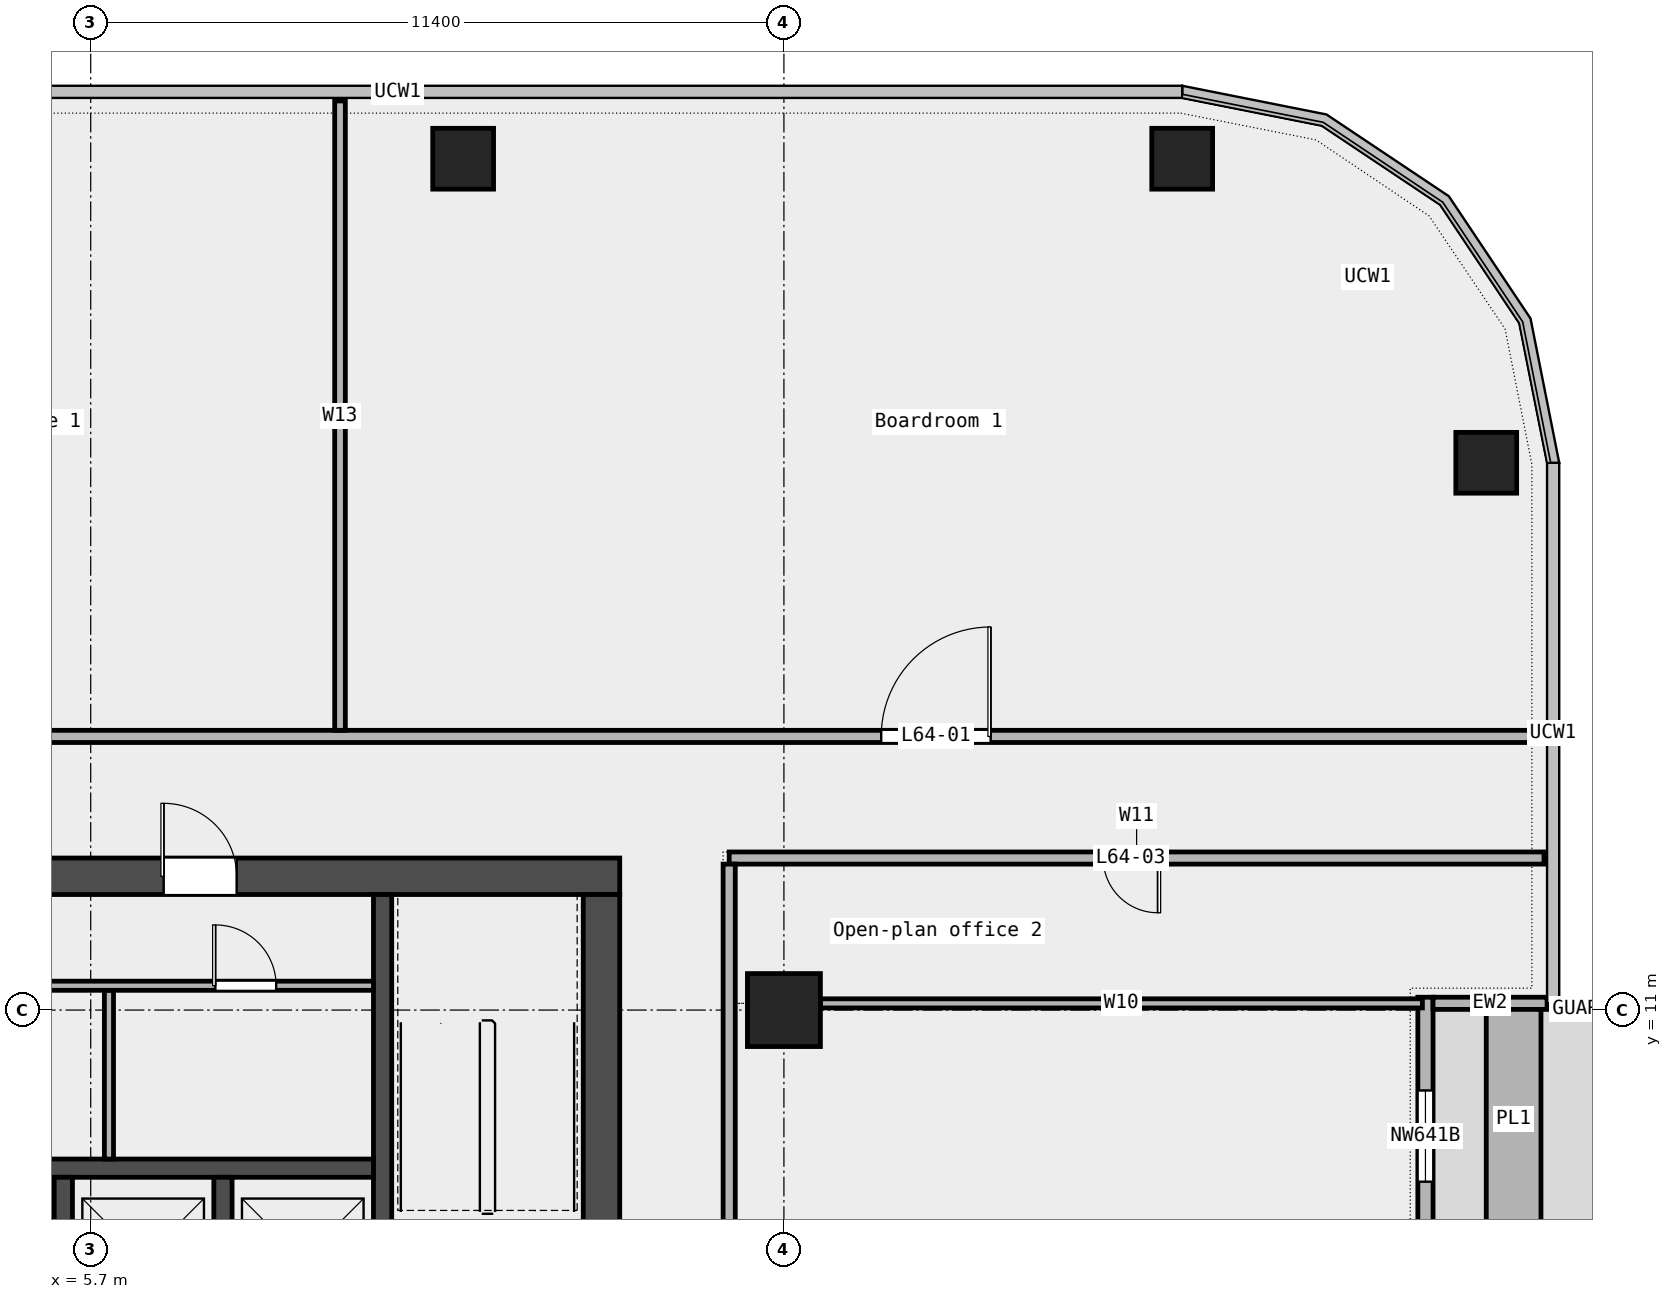
"""IFC4 building model, lengths in metres.
Left out: names, types, materials, properties, quantities, classifications, styles, units other than length and angle.
Written with IfcOpenShell. Run it as: python <this file> out.ifc"""

import sys

from ifc_helpers import new_model, si_unit, direction, frame, frame_2d, origin, origin_2d, place, context, subcontext, project, spatial, rectangle, extrude, element, fill, save


model = new_model("IFC4")
c1 = context("Model", 3, precision=1e-05, world=origin(), true_north=direction((0.0, 1.0)))
c2 = subcontext(c1, "Body", "Model", "MODEL_VIEW")
j1 = project(units=[si_unit("LENGTHUNIT", "METRE"), si_unit("PLANEANGLEUNIT", "RADIAN")], contexts=[c1])
p1 = place(None, origin())
s1 = spatial("IfcSite", under=j1, at=p1, CompositionType="ELEMENT")
p2 = place(p1, origin())
s2 = spatial("IfcBuilding", under=s1, at=p2, CompositionType="ELEMENT")
p3 = place(p2, frame((0.0, 0.0, 295.4)))
s3 = spatial("IfcBuildingStorey", under=s2, at=p3, CompositionType="ELEMENT", Elevation=295.4)
for number, where, z_axis, x_axis in (
    (1, (28.65, 20.0, 0.0), (0.0, 0.0, 1.0), (1.0, 0.0, 0.0)),
    (2, (23.65, 25.0, 0.0), (0.0, 0.0, 1.0), (1.0, 0.0, 0.0)),
    (3, (11.825, 25.0, 0.0), (0.0, 0.0, 1.0), (1.0, 0.0, 0.0)),
):
    element("IfcColumn", number, at=place(p3, frame(where, z_axis=z_axis, x_axis=x_axis)), inside=s3, PredefinedType="COLUMN", context=c2, shape_type="SweptSolid", body=[
        extrude(rectangle(XDim=1.0, YDim=1.0, at=origin_2d()), origin(), (0.0, 0.0, 1.0), 3.6),
    ])
p4 = place(p3, frame((17.1, 11.0, 0.0), z_axis=(0.0, 0.0, 1.0), x_axis=(1.0, 0.0, 0.0)))
e4 = element("IfcColumn", 4, at=p4, inside=s3, PredefinedType="COLUMN", context=c2, shape_type="SweptSolid", body=[
    extrude(rectangle(XDim=1.2, YDim=1.2, at=origin_2d()), origin(), (0.0, 0.0, 1.0), 3.6),
])
p5 = place(p3, frame((27.65, -2.322, 0.0), z_axis=(0.0, 0.0, 1.0), x_axis=(0.0, 1.0, 0.0)))
e5 = element("IfcWall", 5, at=p5, inside=s3, PredefinedType="STANDARD", context=c2, shape_type="SweptSolid", body=[
    extrude(rectangle(XDim=13.533, YDim=0.25, at=frame_2d((6.767, 0.0))), origin(), (0.0, 0.0, 1.0), 3.6),
])
p6 = place(p5, frame((1.5, 0.0, 0.45)))
e6 = element("IfcOpeningElement", 6, at=p6, cuts=e5, PredefinedType="OPENING", context=c2, shape_type="SweptSolid", body=[
    extrude(rectangle(XDim=1.5, YDim=2.4, at=frame_2d((0.75, 1.2))), frame((0.0, 0.137, 0.0), z_axis=(0.0, -1.0, 0.0), x_axis=(1.0, 0.0, 0.0)), (0.0, 0.0, 1.0), 0.274),
])
p7 = place(p5, frame((5.75, 0.0, 0.0)))
e7 = element("IfcOpeningElement", 7, at=p7, cuts=e5, PredefinedType="OPENING", context=c2, shape_type="SweptSolid", body=[
    extrude(rectangle(XDim=1.8, YDim=2.4, at=frame_2d((0.9, 1.2))), frame((0.0, 0.137, 0.0), z_axis=(0.0, -1.0, 0.0), x_axis=(1.0, 0.0, 0.0)), (0.0, 0.0, 1.0), 0.274),
])
p8 = place(p5, frame((10.5, 0.0, 0.45)))
e8 = element("IfcOpeningElement", 8, at=p8, cuts=e5, PredefinedType="OPENING", context=c2, shape_type="SweptSolid", body=[
    extrude(rectangle(XDim=1.5, YDim=2.4, at=frame_2d((0.75, 1.2))), frame((0.0, 0.137, 0.0), z_axis=(0.0, -1.0, 0.0), x_axis=(1.0, 0.0, 0.0)), (0.0, 0.0, 1.0), 0.274),
])
p9 = place(p3, frame((29.65, 11.111, 0.0), z_axis=(0.0, 0.0, 1.0), x_axis=(-1.0, 0.0, 0.0)))
e9 = element("IfcWall", 9, at=p9, inside=s3, PredefinedType="STANDARD", context=c2, shape_type="SweptSolid", body=[
    extrude(rectangle(XDim=1.875, YDim=0.2, at=frame_2d((0.938, 0.0))), origin(), (0.0, 0.0, 1.0), 3.6),
])
p10 = place(p3, frame((29.1, 7.411, 0.0), z_axis=(0.0, 0.0, 1.0), x_axis=(0.0, 1.0, 0.0)))
e10 = element("IfcWall", 10, at=p10, inside=s3, PredefinedType="STANDARD", context=c2, shape_type="SweptSolid", body=[
    extrude(rectangle(XDim=3.6, YDim=0.9, at=frame_2d((1.8, 0.0))), origin(), (0.0, 0.0, 1.0), 0.7),
])
p11 = place(p3, frame((17.7, 11.11, 0.0), z_axis=(0.0, 0.0, 1.0), x_axis=(1.0, 0.0, 0.0)))
e11 = element("IfcWall", 11, at=p11, inside=s3, PredefinedType="PARTITIONING", context=c2, shape_type="SweptSolid", body=[
    extrude(rectangle(XDim=9.9, YDim=0.15, at=frame_2d((4.95, 0.0))), origin(), (0.0, 0.0, 1.0), 3.6),
])
p12 = place(p3, frame((16.2, 13.5, 0.0), z_axis=(0.0, 0.0, 1.0), x_axis=(1.0, 0.0, 0.0)))
e12 = element("IfcWall", 12, at=p12, inside=s3, PredefinedType="PARTITIONING", context=c2, shape_type="SweptSolid", body=[
    extrude(rectangle(XDim=13.4, YDim=0.2, at=frame_2d((6.7, 0.0))), origin(), (0.0, 0.0, 1.0), 3.6),
])
p13 = place(p12, frame((6.15, 0.0, 0.0)))
e13 = element("IfcOpeningElement", 13, at=p13, cuts=e12, PredefinedType="OPENING", context=c2, shape_type="SweptSolid", body=[
    extrude(rectangle(XDim=0.9, YDim=2.1, at=frame_2d((0.45, 1.05))), frame((0.0, 0.112, 0.0), z_axis=(0.0, -1.0, 0.0), x_axis=(1.0, 0.0, 0.0)), (0.0, 0.0, 1.0), 0.224),
])
p14 = place(p3, frame((-29.6, 15.5, 0.0), z_axis=(0.0, 0.0, 1.0), x_axis=(1.0, 0.0, 0.0)))
e14 = element("IfcWall", 14, at=p14, inside=s3, PredefinedType="PARTITIONING", context=c2, shape_type="SweptSolid", body=[
    extrude(rectangle(XDim=59.2, YDim=0.2, at=frame_2d((29.6, 0.0))), origin(), (0.0, 0.0, 1.0), 3.6),
])
p15 = place(p14, frame((48.3, 0.0, 0.0)))
e15 = element("IfcOpeningElement", 15, at=p15, cuts=e14, PredefinedType="OPENING", context=c2, shape_type="SweptSolid", body=[
    extrude(rectangle(XDim=1.8, YDim=2.1, at=frame_2d((0.9, 1.05))), frame((0.0, 0.112, 0.0), z_axis=(0.0, -1.0, 0.0), x_axis=(1.0, 0.0, 0.0)), (0.0, 0.0, 1.0), 0.224),
])
p16 = place(p14, frame((32.675, 0.0, 0.0)))
e16 = element("IfcOpeningElement", 16, at=p16, cuts=e14, PredefinedType="OPENING", context=c2, shape_type="SweptSolid", body=[
    extrude(rectangle(XDim=1.5, YDim=2.1, at=frame_2d((0.75, 1.05))), frame((0.0, 0.112, 0.0), z_axis=(0.0, -1.0, 0.0), x_axis=(1.0, 0.0, 0.0)), (0.0, 0.0, 1.0), 0.224),
])
p17 = place(p14, frame((6.625, 0.0, 0.0)))
e17 = element("IfcOpeningElement", 17, at=p17, cuts=e14, PredefinedType="OPENING", context=c2, shape_type="SweptSolid", body=[
    extrude(rectangle(XDim=1.5, YDim=2.1, at=frame_2d((0.75, 1.05))), frame((0.0, 0.112, 0.0), z_axis=(0.0, -1.0, 0.0), x_axis=(1.0, 0.0, 0.0)), (0.0, 0.0, 1.0), 0.224),
])
p18 = place(p14, frame((20.25, 0.0, 0.0)))
e18 = element("IfcOpeningElement", 18, at=p18, cuts=e14, PredefinedType="OPENING", context=c2, shape_type="SweptSolid", body=[
    extrude(rectangle(XDim=1.5, YDim=2.1, at=frame_2d((0.75, 1.05))), frame((0.0, 0.112, 0.0), z_axis=(0.0, -1.0, 0.0), x_axis=(1.0, 0.0, 0.0)), (0.0, 0.0, 1.0), 0.224),
])
p19 = place(p3, frame((9.8, 15.6, 0.0), z_axis=(0.0, 0.0, 1.0), x_axis=(0.0, 1.0, 0.0)))
e19 = element("IfcWall", 19, at=p19, inside=s3, PredefinedType="PARTITIONING", context=c2, shape_type="SweptSolid", body=[
    extrude(rectangle(XDim=10.35, YDim=0.175, at=frame_2d((5.175, 0.0))), origin(), (0.0, 0.0, 1.0), 3.6),
])
p20 = place(p3, frame((16.2, -7.1, 0.0), z_axis=(0.0, 0.0, 1.0), x_axis=(0.0, 1.0, 0.0)))
e20 = element("IfcWall", 20, at=p20, inside=s3, PredefinedType="PARTITIONING", context=c2, shape_type="SweptSolid", body=[
    extrude(rectangle(XDim=20.5, YDim=0.2, at=frame_2d((10.25, 0.0))), origin(), (0.0, 0.0, 1.0), 3.6),
])
p21 = place(p20, frame((10.795, 0.0, 0.0)))
e21 = element("IfcOpeningElement", 21, at=p21, cuts=e20, PredefinedType="OPENING", context=c2, shape_type="SweptSolid", body=[
    extrude(rectangle(XDim=1.5, YDim=2.1, at=frame_2d((0.75, 1.05))), frame((0.0, 0.112, 0.0), z_axis=(0.0, -1.0, 0.0), x_axis=(1.0, 0.0, 0.0)), (0.0, 0.0, 1.0), 0.224),
])
p22 = place(p3, frame((-14.4, 13.2, 0.0), z_axis=(0.0, 0.0, 1.0), x_axis=(1.0, 0.0, 0.0)))
e22 = element("IfcWall", 22, at=p22, inside=s3, PredefinedType="SHEAR", context=c2, shape_type="SweptSolid", body=[
    extrude(rectangle(XDim=28.8, YDim=0.6, at=frame_2d((14.4, 0.0))), origin(), (0.0, 0.0, 1.0), 3.7),
])
p23 = place(p22, frame((6.3, 0.0, 0.0)))
e23 = element("IfcOpeningElement", 23, at=p23, cuts=e22, PredefinedType="OPENING", context=c2, shape_type="SweptSolid", body=[
    extrude(rectangle(XDim=1.2, YDim=2.1, at=frame_2d((0.6, 1.05))), frame((0.0, 0.312, 0.0), z_axis=(0.0, -1.0, 0.0), x_axis=(1.0, 0.0, 0.0)), (0.0, 0.0, 1.0), 0.624),
])
p24 = place(p22, frame((21.3, 0.0, 0.0)))
e24 = element("IfcOpeningElement", 24, at=p24, cuts=e22, PredefinedType="OPENING", context=c2, shape_type="SweptSolid", body=[
    extrude(rectangle(XDim=1.2, YDim=2.1, at=frame_2d((0.6, 1.05))), frame((0.0, 0.312, 0.0), z_axis=(0.0, -1.0, 0.0), x_axis=(1.0, 0.0, 0.0)), (0.0, 0.0, 1.0), 0.624),
])
p25 = place(p3, frame((14.1, -6.6, 0.0), z_axis=(0.0, 0.0, 1.0), x_axis=(0.0, 1.0, 0.0)))
e25 = element("IfcWall", 25, at=p25, inside=s3, PredefinedType="SHEAR", context=c2, shape_type="SweptSolid", body=[
    extrude(rectangle(XDim=19.5, YDim=0.6, at=frame_2d((9.75, 0.0))), origin(), (0.0, 0.0, 1.0), 3.7),
])
p26 = place(p25, frame((9.3, 0.0, 0.0)))
e26 = element("IfcOpeningElement", 26, at=p26, cuts=e25, PredefinedType="OPENING", context=c2, shape_type="SweptSolid", body=[
    extrude(rectangle(XDim=1.8, YDim=2.1, at=frame_2d((0.9, 1.05))), frame((0.0, 0.312, 0.0), z_axis=(0.0, -1.0, 0.0), x_axis=(1.0, 0.0, 0.0)), (0.0, 0.0, 1.0), 0.624),
])
p27 = place(p3, frame((10.5, 5.25, 0.0), z_axis=(0.0, 0.0, 1.0), x_axis=(0.0, 1.0, 0.0)))
e27 = element("IfcWall", 27, at=p27, inside=s3, PredefinedType="SHEAR", context=c2, shape_type="SweptSolid", body=[
    extrude(rectangle(XDim=7.65, YDim=0.3, at=frame_2d((3.825, 0.0))), origin(), (0.0, 0.0, 1.0), 3.7),
])
p28 = place(p3, frame((-10.35, 8.4, 0.0), z_axis=(0.0, 0.0, 1.0), x_axis=(1.0, 0.0, 0.0)))
e28 = element("IfcWall", 28, at=p28, inside=s3, PredefinedType="SOLIDWALL", context=c2, shape_type="SweptSolid", body=[
    extrude(rectangle(XDim=20.7, YDim=0.3, at=frame_2d((10.35, 0.0))), origin(), (0.0, 0.0, 1.0), 3.7),
])
for number, where, z_axis, x_axis in (
    (29, (5.25, 5.55, 0.0), (0.0, 0.0, 1.0), (0.0, 1.0, 0.0)),
    (30, (7.875, 5.55, 0.0), (0.0, 0.0, 1.0), (0.0, 1.0, 0.0)),
):
    element("IfcWall", number, at=place(p3, frame(where, z_axis=z_axis, x_axis=x_axis)), inside=s3, PredefinedType="SOLIDWALL", context=c2, shape_type="SweptSolid", body=[
        extrude(rectangle(XDim=2.7, YDim=0.3, at=frame_2d((1.35, 0.0))), origin(), (0.0, 0.0, 1.0), 3.7),
    ])
p29 = place(p3, frame((6.0, 8.55, 0.0), z_axis=(0.0, 0.0, 1.0), x_axis=(0.0, 1.0, 0.0)))
e31 = element("IfcWall", 31, at=p29, inside=s3, PredefinedType="PARTITIONING", context=c2, shape_type="SweptSolid", body=[
    extrude(rectangle(XDim=2.775, YDim=0.15, at=frame_2d((1.387, 0.0))), origin(), (0.0, 0.0, 1.0), 3.7),
])
p30 = place(p3, frame((-10.35, 11.4, 0.0), z_axis=(0.0, 0.0, 1.0), x_axis=(1.0, 0.0, 0.0)))
e32 = element("IfcWall", 32, at=p30, inside=s3, PredefinedType="PARTITIONING", context=c2, shape_type="SweptSolid", body=[
    extrude(rectangle(XDim=20.7, YDim=0.15, at=frame_2d((10.35, 0.0))), origin(), (0.0, 0.0, 1.0), 3.7),
])
p31 = place(p30, frame((1.413, 0.0, 0.0)))
e33 = element("IfcOpeningElement", 33, at=p31, cuts=e32, PredefinedType="OPENING", context=c2, shape_type="SweptSolid", body=[
    extrude(rectangle(XDim=1.0, YDim=2.1, at=frame_2d((0.5, 1.05))), frame((0.0, 0.087, 0.0), z_axis=(0.0, -1.0, 0.0), x_axis=(1.0, 0.0, 0.0)), (0.0, 0.0, 1.0), 0.174),
])
p32 = place(p30, frame((5.538, 0.0, 0.0)))
e34 = element("IfcOpeningElement", 34, at=p32, cuts=e32, PredefinedType="OPENING", context=c2, shape_type="SweptSolid", body=[
    extrude(rectangle(XDim=1.0, YDim=2.1, at=frame_2d((0.5, 1.05))), frame((0.0, 0.087, 0.0), z_axis=(0.0, -1.0, 0.0), x_axis=(1.0, 0.0, 0.0)), (0.0, 0.0, 1.0), 0.174),
])
p33 = place(p30, frame((9.663, 0.0, 0.0)))
e35 = element("IfcOpeningElement", 35, at=p33, cuts=e32, PredefinedType="OPENING", context=c2, shape_type="SweptSolid", body=[
    extrude(rectangle(XDim=1.0, YDim=2.1, at=frame_2d((0.5, 1.05))), frame((0.0, 0.087, 0.0), z_axis=(0.0, -1.0, 0.0), x_axis=(1.0, 0.0, 0.0)), (0.0, 0.0, 1.0), 0.174),
])
p34 = place(p30, frame((13.788, 0.0, 0.0)))
e36 = element("IfcOpeningElement", 36, at=p34, cuts=e32, PredefinedType="OPENING", context=c2, shape_type="SweptSolid", body=[
    extrude(rectangle(XDim=1.0, YDim=2.1, at=frame_2d((0.5, 1.05))), frame((0.0, 0.087, 0.0), z_axis=(0.0, -1.0, 0.0), x_axis=(1.0, 0.0, 0.0)), (0.0, 0.0, 1.0), 0.174),
])
p35 = place(p30, frame((18.1, 0.0, 0.0)))
e37 = element("IfcOpeningElement", 37, at=p35, cuts=e32, PredefinedType="OPENING", context=c2, shape_type="SweptSolid", body=[
    extrude(rectangle(XDim=1.0, YDim=2.1, at=frame_2d((0.5, 1.05))), frame((0.0, 0.087, 0.0), z_axis=(0.0, -1.0, 0.0), x_axis=(1.0, 0.0, 0.0)), (0.0, 0.0, 1.0), 0.174),
])
p36 = place(p8, origin())
e38 = element("IfcWindow", 38, at=p36, inside=s3, PartitioningType="SINGLE_PANEL", PredefinedType="WINDOW", context=c2, shape_type="SweptSolid", body=[
    extrude(rectangle(XDim=1.5, YDim=2.4, at=frame_2d((0.75, 1.2))), frame((0.0, 0.03, 0.0), z_axis=(0.0, -1.0, 0.0), x_axis=(1.0, 0.0, 0.0)), (0.0, 0.0, 1.0), 0.06),
])
fill(e8, e38)
p37 = place(p15, origin())
e39 = element("IfcDoor", 39, at=p37, inside=s3, OperationType="DOUBLE_DOOR_SINGLE_SWING", PredefinedType="DOOR", context=c2, shape_type="SweptSolid", body=[
    extrude(rectangle(XDim=1.8, YDim=2.1, at=frame_2d((0.9, 1.05))), frame((0.0, 0.025, 0.0), z_axis=(0.0, -1.0, 0.0), x_axis=(1.0, 0.0, 0.0)), (0.0, 0.0, 1.0), 0.05),
])
fill(e15, e39)
p38 = place(p13, origin())
e40 = element("IfcDoor", 40, at=p38, inside=s3, OperationType="SINGLE_SWING_LEFT", PredefinedType="DOOR", context=c2, shape_type="SweptSolid", body=[
    extrude(rectangle(XDim=0.9, YDim=2.1, at=frame_2d((0.45, 1.05))), frame((0.0, 0.025, 0.0), z_axis=(0.0, -1.0, 0.0), x_axis=(1.0, 0.0, 0.0)), (0.0, 0.0, 1.0), 0.05),
])
fill(e13, e40)
p39 = place(p35, origin())
e41 = element("IfcDoor", 41, at=p39, inside=s3, OperationType="SINGLE_SWING_LEFT", PredefinedType="DOOR", context=c2, shape_type="SweptSolid", body=[
    extrude(rectangle(XDim=1.0, YDim=2.1, at=frame_2d((0.5, 1.05))), frame((0.0, 0.025, 0.0), z_axis=(0.0, -1.0, 0.0), x_axis=(1.0, 0.0, 0.0)), (0.0, 0.0, 1.0), 0.05),
])
fill(e37, e41)
p40 = place(p24, origin())
e42 = element("IfcDoor", 42, at=p40, inside=s3, OperationType="SINGLE_SWING_RIGHT", PredefinedType="DOOR", context=c2, shape_type="SweptSolid", body=[
    extrude(rectangle(XDim=1.2, YDim=2.1, at=frame_2d((0.6, 1.05))), frame((0.0, 0.025, 0.0), z_axis=(0.0, -1.0, 0.0), x_axis=(1.0, 0.0, 0.0)), (0.0, 0.0, 1.0), 0.05),
])
fill(e24, e42)
save(model, sys.argv[1])
